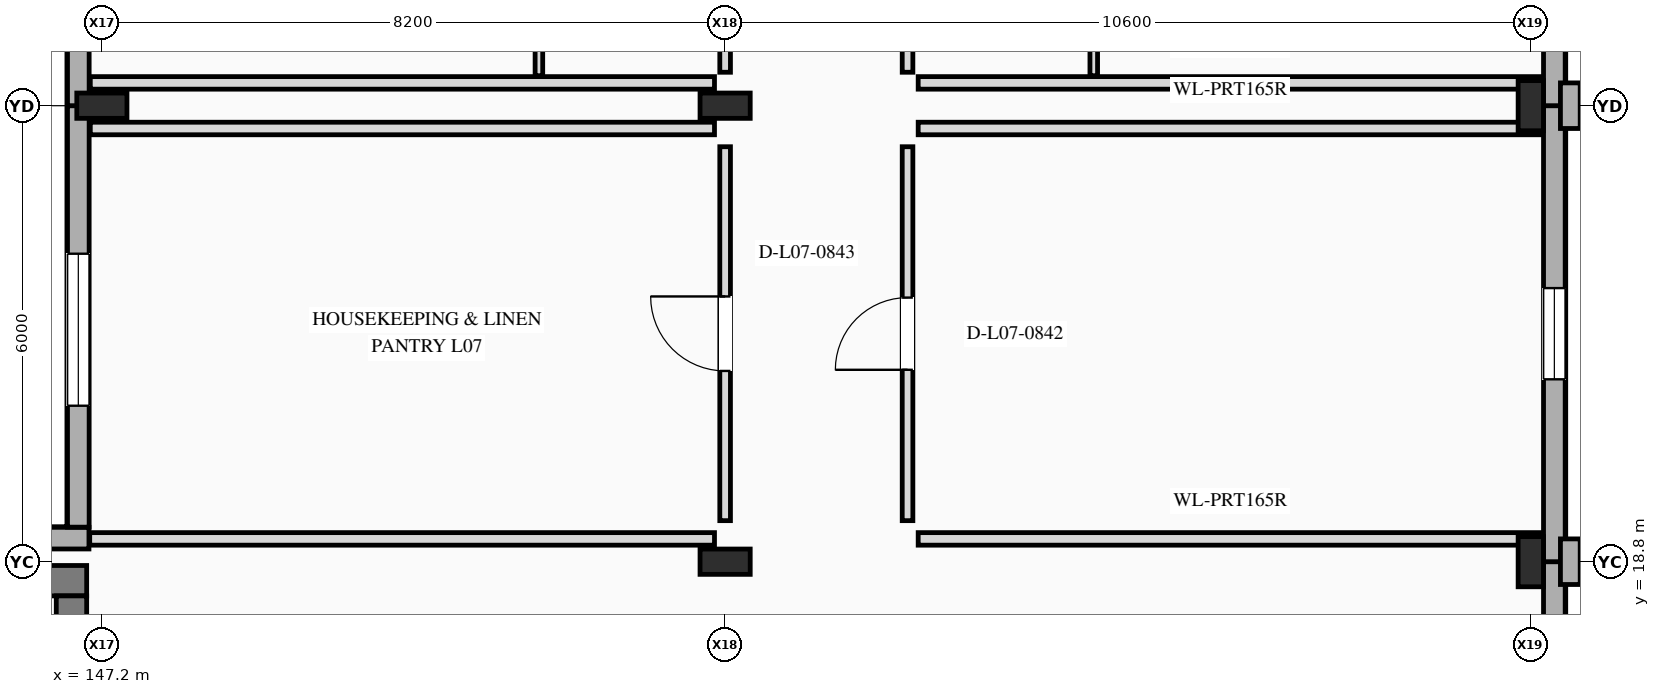
"""IFC4 building model, lengths in metres.
Left out: names, types, materials, properties, quantities, classifications, styles, units other than length and angle.
Written with IfcOpenShell. Run it as: python <this file> out.ifc"""

import sys

from ifc_helpers import new_model, si_unit, direction, frame, frame_2d, origin, origin_2d, place, context, subcontext, project, spatial, rectangle, i_section, extrude, element, fill, save


model = new_model("IFC4")
c1 = context("Model", 3, precision=1e-05, world=origin(), true_north=direction((0.0, 1.0)))
c2 = subcontext(c1, "Body", "Model", "MODEL_VIEW")
j1 = project(units=[si_unit("LENGTHUNIT", "METRE"), si_unit("PLANEANGLEUNIT", "RADIAN")], contexts=[c1])
p1 = place(None, origin())
s1 = spatial("IfcSite", under=j1, at=p1, CompositionType="ELEMENT")
p2 = place(p1, origin())
s2 = spatial("IfcBuilding", under=s1, at=p2, CompositionType="ELEMENT")
p3 = place(p2, frame((0.0, 0.0, 30.6)))
s3 = spatial("IfcBuildingStorey", under=s2, at=p3, CompositionType="ELEMENT", Elevation=30.6)
for number, where, z_axis, x_axis in (
    (1, (147.2, 24.8, 0.0), (0.0, 0.0, 1.0), (0.0, 1.0, 0.0)),
    (2, (155.4, 18.8, 0.0), (0.0, 0.0, 1.0), (0.0, 1.0, 0.0)),
    (3, (155.4, 24.8, 0.0), (0.0, 0.0, 1.0), (0.0, 1.0, 0.0)),
    (4, (166.0, 18.8, 0.0), (0.0, 0.0, 1.0), (1.0, 0.0, 0.0)),
    (5, (166.0, 24.8, 0.0), (0.0, 0.0, 1.0), (1.0, 0.0, 0.0)),
):
    element("IfcColumn", number, at=place(p3, frame(where, z_axis=z_axis, x_axis=x_axis)), inside=s3, PredefinedType="COLUMN", context=c2, shape_type="SweptSolid", body=[
        extrude(i_section(OverallWidth=0.333, OverallDepth=0.66, WebThickness=0.024, FlangeThickness=0.044, at=origin_2d()), origin(), (0.0, 0.0, 1.0), 3.5),
    ])
p4 = place(p3, frame((166.31, 14.46, 0.0), z_axis=(0.0, 0.0, 1.0), x_axis=(0.0, 1.0, 0.0)))
e6 = element("IfcWall", 6, at=p4, inside=s3, PredefinedType="STANDARD", context=c2, shape_type="SweptSolid", body=[
    extrude(rectangle(XDim=4.34, YDim=0.285, at=frame_2d((2.17, 0.0))), origin(), (0.0, 0.0, 1.0), 3.5),
])
p5 = place(p4, frame((1.42, 0.0, 0.88)))
e7 = element("IfcOpeningElement", 7, at=p5, cuts=e6, PredefinedType="OPENING", context=c2, shape_type="SweptSolid", body=[
    extrude(rectangle(XDim=1.5, YDim=1.7, at=frame_2d((0.75, 0.85))), frame((0.0, 0.152, 0.0), z_axis=(0.0, -1.0, 0.0), x_axis=(1.0, 0.0, 0.0)), (0.0, 0.0, 1.0), 0.305),
])
p6 = place(p3, frame((166.31, 18.8, 0.0), z_axis=(0.0, 0.0, 1.0), x_axis=(0.0, 1.0, 0.0)))
e8 = element("IfcWall", 8, at=p6, inside=s3, PredefinedType="STANDARD", context=c2, shape_type="SweptSolid", body=[
    extrude(rectangle(XDim=6.0, YDim=0.285, at=frame_2d((3.0, 0.0))), origin(), (0.0, 0.0, 1.0), 3.5),
])
p7 = place(p6, frame((2.4, 0.0, 0.85)))
e9 = element("IfcOpeningElement", 9, at=p7, cuts=e8, PredefinedType="OPENING", context=c2, shape_type="SweptSolid", body=[
    extrude(rectangle(XDim=1.2, YDim=1.6, at=frame_2d((0.6, 0.8))), frame((0.0, 0.152, 0.0), z_axis=(0.0, -1.0, 0.0), x_axis=(1.0, 0.0, 0.0)), (0.0, 0.0, 1.0), 0.305),
])
p8 = place(p3, frame((166.52, 18.5, 0.0), z_axis=(0.0, 0.0, 1.0), x_axis=(0.0, 1.0, 0.0)))
e10 = element("IfcWall", 10, at=p8, inside=s3, PredefinedType="ELEMENTEDWALL", context=c2, shape_type="SweptSolid", body=[
    extrude(rectangle(XDim=0.6, YDim=0.26, at=frame_2d((0.3, 0.0))), origin(), (0.0, 0.0, 1.0), 3.5),
])
p9 = place(p3, frame((166.31, 24.8, 0.0), z_axis=(0.0, 0.0, 1.0), x_axis=(0.0, 1.0, 0.0)))
e11 = element("IfcWall", 11, at=p9, inside=s3, PredefinedType="STANDARD", context=c2, shape_type="SweptSolid", body=[
    extrude(rectangle(XDim=8.4, YDim=0.285, at=frame_2d((4.2, 0.0))), origin(), (0.0, 0.0, 1.0), 3.5),
])
p10 = place(p9, frame((3.65, 0.0, 0.85)))
e12 = element("IfcOpeningElement", 12, at=p10, cuts=e11, PredefinedType="OPENING", context=c2, shape_type="SweptSolid", body=[
    extrude(rectangle(XDim=1.1, YDim=1.5, at=frame_2d((0.55, 0.75))), frame((0.0, 0.152, 0.0), z_axis=(0.0, -1.0, 0.0), x_axis=(1.0, 0.0, 0.0)), (0.0, 0.0, 1.0), 0.305),
])
p11 = place(p3, frame((166.52, 24.5, 0.0), z_axis=(0.0, 0.0, 1.0), x_axis=(0.0, 1.0, 0.0)))
e13 = element("IfcWall", 13, at=p11, inside=s3, PredefinedType="ELEMENTEDWALL", context=c2, shape_type="SweptSolid", body=[
    extrude(rectangle(XDim=0.6, YDim=0.26, at=frame_2d((0.3, 0.0))), origin(), (0.0, 0.0, 1.0), 3.5),
])
p12 = place(p3, frame((147.03, 19.11, 0.0), z_axis=(0.0, 0.0, 1.0), x_axis=(-1.0, 0.0, 0.0)))
e14 = element("IfcWall", 14, at=p12, inside=s3, PredefinedType="STANDARD", context=c2, shape_type="SweptSolid", body=[
    extrude(rectangle(XDim=11.03, YDim=0.285, at=frame_2d((5.515, 0.0))), origin(), (0.0, 0.0, 1.0), 3.5),
])
p13 = place(p3, frame((146.89, 19.254, 0.0), z_axis=(0.0, 0.0, 1.0), x_axis=(0.0, 1.0, 0.0)))
e15 = element("IfcWall", 15, at=p13, inside=s3, PredefinedType="STANDARD", context=c2, shape_type="SweptSolid", body=[
    extrude(rectangle(XDim=5.546, YDim=0.285, at=frame_2d((2.773, 0.0))), origin(), (0.0, 0.0, 1.0), 3.5),
])
p14 = place(p13, frame((1.598, 0.0, 0.85)))
e16 = element("IfcOpeningElement", 16, at=p14, cuts=e15, PredefinedType="OPENING", context=c2, shape_type="SweptSolid", body=[
    extrude(rectangle(XDim=2.0, YDim=1.65, at=frame_2d((1.0, 0.825))), frame((0.0, 0.152, 0.0), z_axis=(0.0, -1.0, 0.0), x_axis=(1.0, 0.0, 0.0)), (0.0, 0.0, 1.0), 0.305),
])
p15 = place(p3, frame((146.89, 24.8, 0.0), z_axis=(0.0, 0.0, 1.0), x_axis=(0.0, 1.0, 0.0)))
e17 = element("IfcWall", 17, at=p15, inside=s3, PredefinedType="STANDARD", context=c2, shape_type="SweptSolid", body=[
    extrude(rectangle(XDim=8.4, YDim=0.285, at=frame_2d((4.2, 0.0))), origin(), (0.0, 0.0, 1.0), 3.5),
])
p16 = place(p15, frame((3.05, 0.0, 0.85)))
e18 = element("IfcOpeningElement", 18, at=p16, cuts=e17, PredefinedType="OPENING", context=c2, shape_type="SweptSolid", body=[
    extrude(rectangle(XDim=2.3, YDim=1.7, at=frame_2d((1.15, 0.85))), frame((0.0, 0.152, 0.0), z_axis=(0.0, -1.0, 0.0), x_axis=(1.0, 0.0, 0.0)), (0.0, 0.0, 1.0), 0.305),
])
p17 = place(p3, frame((147.0, 18.55, 0.0), z_axis=(0.0, 0.0, 1.0), x_axis=(-1.0, 0.0, 0.0)))
e19 = element("IfcWall", 19, at=p17, inside=s3, PredefinedType="SHEAR", context=c2, shape_type="SweptSolid", body=[
    extrude(rectangle(XDim=10.6, YDim=0.4, at=frame_2d((5.3, 0.0))), origin(), (0.0, 0.0, 1.0), 3.5),
])
p18 = place(p3, frame((146.8, 11.0, 0.0), z_axis=(0.0, 0.0, 1.0), x_axis=(0.0, 1.0, 0.0)))
e20 = element("IfcWall", 20, at=p18, inside=s3, PredefinedType="SHEAR", context=c2, shape_type="SweptSolid", body=[
    extrude(rectangle(XDim=7.35, YDim=0.4, at=frame_2d((3.675, 0.0))), origin(), (0.0, 0.0, 1.0), 3.5),
])
p19 = place(p18, frame((5.0, 0.0, 0.0)))
e21 = element("IfcOpeningElement", 21, at=p19, cuts=e20, PredefinedType="OPENING", context=c2, shape_type="SweptSolid", body=[
    extrude(rectangle(XDim=0.95, YDim=2.2, at=frame_2d((0.475, 1.1))), frame((0.0, 0.21, 0.0), z_axis=(0.0, -1.0, 0.0), x_axis=(1.0, 0.0, 0.0)), (0.0, 0.0, 1.0), 0.42),
])
p20 = place(p18, frame((0.175, 0.0, 0.0)))
e22 = element("IfcOpeningElement", 22, at=p20, cuts=e20, PredefinedType="OPENING", context=c2, shape_type="SweptSolid", body=[
    extrude(rectangle(XDim=1.15, YDim=2.25, at=frame_2d((0.575, 1.125))), frame((0.0, 0.21, 0.0), z_axis=(0.0, -1.0, 0.0), x_axis=(1.0, 0.0, 0.0)), (0.0, 0.0, 1.0), 0.42),
])
p21 = place(p18, frame((1.875, 0.0, 0.0)))
e23 = element("IfcOpeningElement", 23, at=p21, cuts=e20, PredefinedType="OPENING", context=c2, shape_type="SweptSolid", body=[
    extrude(rectangle(XDim=1.15, YDim=2.25, at=frame_2d((0.575, 1.125))), frame((0.0, 0.21, 0.0), z_axis=(0.0, -1.0, 0.0), x_axis=(1.0, 0.0, 0.0)), (0.0, 0.0, 1.0), 0.42),
])
p22 = place(p3, frame((157.8, 25.24, 0.0), z_axis=(0.0, 0.0, 1.0), x_axis=(0.0, 1.0, 0.0)))
e24 = element("IfcWall", 24, at=p22, inside=s3, PredefinedType="PARTITIONING", context=c2, shape_type="SweptSolid", body=[
    extrude(rectangle(XDim=1.93, YDim=0.14, at=frame_2d((0.965, 0.0))), origin(), (0.0, 0.0, 1.0), 2.753),
])
p23 = place(p3, frame((157.94, 25.1, 0.0), z_axis=(0.0, 0.0, 1.0), x_axis=(1.0, 0.0, 0.0)))
e25 = element("IfcWall", 25, at=p23, inside=s3, PredefinedType="PARTITIONING", context=c2, shape_type="SweptSolid", body=[
    extrude(rectangle(XDim=8.213, YDim=0.165, at=frame_2d((4.106, 0.0))), origin(), (0.0, 0.0, 1.0), 2.59),
])
p24 = place(p3, frame((160.25, 25.195, 0.0), z_axis=(0.0, 0.0, 1.0), x_axis=(0.0, 1.0, 0.0)))
e26 = element("IfcWall", 26, at=p24, inside=s3, PredefinedType="PARTITIONING", context=c2, shape_type="SweptSolid", body=[
    extrude(rectangle(XDim=2.015, YDim=0.1, at=frame_2d((1.008, 0.0))), origin(), (0.0, 0.0, 1.0), 2.753),
])
p25 = place(p24, frame((0.543, 0.0, 0.0)))
e27 = element("IfcOpeningElement", 27, at=p25, cuts=e26, PredefinedType="OPENING", context=c2, shape_type="SweptSolid", body=[
    extrude(rectangle(XDim=0.93, YDim=2.22, at=frame_2d((0.465, 1.11))), frame((0.0, 0.06, 0.0), z_axis=(0.0, -1.0, 0.0), x_axis=(1.0, 0.0, 0.0)), (0.0, 0.0, 1.0), 0.12),
])
p26 = place(p3, frame((155.4, 25.24, 0.0), z_axis=(0.0, 0.0, 1.0), x_axis=(0.0, 1.0, 0.0)))
e28 = element("IfcWall", 28, at=p26, inside=s3, PredefinedType="PARTITIONING", context=c2, shape_type="SweptSolid", body=[
    extrude(rectangle(XDim=1.93, YDim=0.14, at=frame_2d((0.965, 0.0))), origin(), (0.0, 0.0, 1.0), 2.674),
])
p27 = place(p3, frame((147.048, 25.1, 0.0), z_axis=(0.0, 0.0, 1.0), x_axis=(1.0, 0.0, 0.0)))
e29 = element("IfcWall", 29, at=p27, inside=s3, PredefinedType="PARTITIONING", context=c2, shape_type="SweptSolid", body=[
    extrude(rectangle(XDim=8.212, YDim=0.165, at=frame_2d((4.106, 0.0))), origin(), (0.0, 0.0, 1.0), 2.613),
])
p28 = place(p3, frame((152.95, 25.195, 0.0), z_axis=(0.0, 0.0, 1.0), x_axis=(0.0, 1.0, 0.0)))
e30 = element("IfcWall", 30, at=p28, inside=s3, PredefinedType="PARTITIONING", context=c2, shape_type="SweptSolid", body=[
    extrude(rectangle(XDim=2.015, YDim=0.1, at=frame_2d((1.008, 0.0))), origin(), (0.0, 0.0, 1.0), 2.808),
])
p29 = place(p28, frame((0.53, 0.0, 0.0)))
e31 = element("IfcOpeningElement", 31, at=p29, cuts=e30, PredefinedType="OPENING", context=c2, shape_type="SweptSolid", body=[
    extrude(rectangle(XDim=0.955, YDim=2.22, at=frame_2d((0.478, 1.11))), frame((0.0, 0.06, 0.0), z_axis=(0.0, -1.0, 0.0), x_axis=(1.0, 0.0, 0.0)), (0.0, 0.0, 1.0), 0.12),
])
p30 = place(p3, frame((157.8, 19.34, 0.0), z_axis=(0.0, 0.0, 1.0), x_axis=(0.0, 1.0, 0.0)))
e32 = element("IfcWall", 32, at=p30, inside=s3, PredefinedType="PARTITIONING", context=c2, shape_type="SweptSolid", body=[
    extrude(rectangle(XDim=4.92, YDim=0.14, at=frame_2d((2.46, 0.0))), origin(), (0.0, 0.0, 1.0), 2.758),
])
p31 = place(p30, frame((1.985, 0.0, 0.0)))
e33 = element("IfcOpeningElement", 33, at=p31, cuts=e32, PredefinedType="OPENING", context=c2, shape_type="SweptSolid", body=[
    extrude(rectangle(XDim=0.95, YDim=2.3, at=frame_2d((0.475, 1.15))), frame((0.0, 0.08, 0.0), z_axis=(0.0, -1.0, 0.0), x_axis=(1.0, 0.0, 0.0)), (0.0, 0.0, 1.0), 0.16),
])
for number, where, z_axis, x_axis in (
    (34, (157.94, 19.1, 0.0), (0.0, 0.0, 1.0), (1.0, 0.0, 0.0)),
    (35, (157.94, 24.5, 0.0), (0.0, 0.0, 1.0), (1.0, 0.0, 0.0)),
):
    element("IfcWall", number, at=place(p3, frame(where, z_axis=z_axis, x_axis=x_axis)), inside=s3, PredefinedType="PARTITIONING", context=c2, shape_type="SweptSolid", body=[
        extrude(rectangle(XDim=8.213, YDim=0.165, at=frame_2d((4.106, 0.0))), origin(), (0.0, 0.0, 1.0), 2.59),
    ])
p32 = place(p3, frame((155.4, 19.34, 0.0), z_axis=(0.0, 0.0, 1.0), x_axis=(0.0, 1.0, 0.0)))
e36 = element("IfcWall", 36, at=p32, inside=s3, PredefinedType="PARTITIONING", context=c2, shape_type="SweptSolid", body=[
    extrude(rectangle(XDim=4.92, YDim=0.14, at=frame_2d((2.46, 0.0))), origin(), (0.0, 0.0, 1.0), 2.674),
])
p33 = place(p32, frame((1.97, 0.0, 0.0)))
e37 = element("IfcOpeningElement", 37, at=p33, cuts=e36, PredefinedType="OPENING", context=c2, shape_type="SweptSolid", body=[
    extrude(rectangle(XDim=0.98, YDim=2.35, at=frame_2d((0.49, 1.175))), frame((0.0, 0.08, 0.0), z_axis=(0.0, -1.0, 0.0), x_axis=(1.0, 0.0, 0.0)), (0.0, 0.0, 1.0), 0.16),
])
p34 = place(p3, frame((147.04, 19.1, 0.0), z_axis=(0.0, 0.0, 1.0), x_axis=(1.0, 0.0, 0.0)))
e38 = element("IfcWall", 38, at=p34, inside=s3, PredefinedType="PARTITIONING", context=c2, shape_type="SweptSolid", body=[
    extrude(rectangle(XDim=8.22, YDim=0.165, at=frame_2d((4.11, 0.0))), origin(), (0.0, 0.0, 1.0), 3.2),
])
p35 = place(p3, frame((147.048, 24.5, 0.0), z_axis=(0.0, 0.0, 1.0), x_axis=(1.0, 0.0, 0.0)))
e39 = element("IfcWall", 39, at=p35, inside=s3, PredefinedType="PARTITIONING", context=c2, shape_type="SweptSolid", body=[
    extrude(rectangle(XDim=8.212, YDim=0.165, at=frame_2d((4.106, 0.0))), origin(), (0.0, 0.0, 1.0), 2.613),
])
p36 = place(p7, origin())
e40 = element("IfcWindow", 40, at=p36, inside=s3, PartitioningType="SINGLE_PANEL", PredefinedType="WINDOW", context=c2, shape_type="SweptSolid", body=[
    extrude(rectangle(XDim=1.2, YDim=1.6, at=frame_2d((0.6, 0.8))), frame((0.0, 0.03, 0.0), z_axis=(0.0, -1.0, 0.0), x_axis=(1.0, 0.0, 0.0)), (0.0, 0.0, 1.0), 0.06),
])
fill(e9, e40)
p37 = place(p14, origin())
e41 = element("IfcWindow", 41, at=p37, inside=s3, PartitioningType="SINGLE_PANEL", PredefinedType="WINDOW", context=c2, shape_type="SweptSolid", body=[
    extrude(rectangle(XDim=2.0, YDim=1.65, at=frame_2d((1.0, 0.825))), frame((0.0, 0.03, 0.0), z_axis=(0.0, -1.0, 0.0), x_axis=(1.0, 0.0, 0.0)), (0.0, 0.0, 1.0), 0.06),
])
fill(e16, e41)
p38 = place(p31, origin())
e42 = element("IfcDoor", 42, at=p38, inside=s3, OperationType="SINGLE_SWING_LEFT", PredefinedType="DOOR", context=c2, shape_type="SweptSolid", body=[
    extrude(rectangle(XDim=0.95, YDim=2.3, at=frame_2d((0.475, 1.15))), frame((0.0, 0.025, 0.0), z_axis=(0.0, -1.0, 0.0), x_axis=(1.0, 0.0, 0.0)), (0.0, 0.0, 1.0), 0.05),
])
fill(e33, e42)
p39 = place(p33, origin())
e43 = element("IfcDoor", 43, at=p39, inside=s3, OperationType="SINGLE_SWING_RIGHT", PredefinedType="DOOR", context=c2, shape_type="SweptSolid", body=[
    extrude(rectangle(XDim=0.98, YDim=2.35, at=frame_2d((0.49, 1.175))), frame((0.0, 0.025, 0.0), z_axis=(0.0, -1.0, 0.0), x_axis=(1.0, 0.0, 0.0)), (0.0, 0.0, 1.0), 0.05),
])
fill(e37, e43)
save(model, sys.argv[1])
